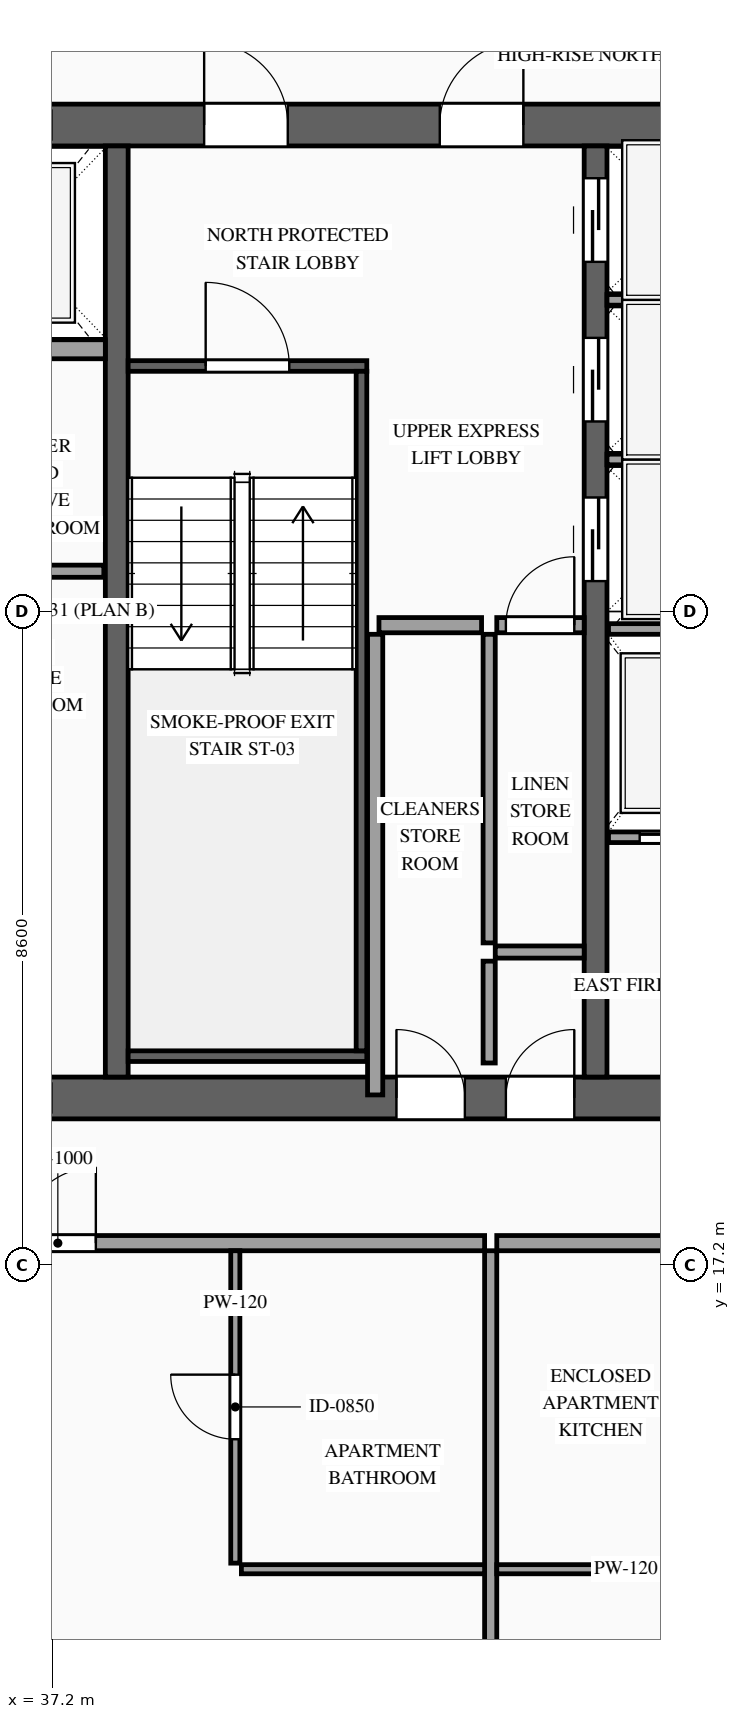
"""IFC4 building model, lengths in metres.
Left out: names, types, materials, properties, quantities, classifications, styles, units other than length and angle.
Written with IfcOpenShell. Run it as: python <this file> out.ifc"""

import sys

from ifc_helpers import new_model, si_unit, direction, frame, frame_2d, origin, place, context, subcontext, project, spatial, rectangle, extrude, source, transform, mapped, element, fill, save


model = new_model("IFC4")
c1 = context("Model", 3, precision=1e-05, world=origin(), true_north=direction((0.0, 1.0)))
c2 = subcontext(c1, "Body", "Model", "MODEL_VIEW")
j1 = project(units=[si_unit("LENGTHUNIT", "METRE"), si_unit("PLANEANGLEUNIT", "RADIAN")], contexts=[c1])
p1 = place(None, origin())
s1 = spatial("IfcSite", under=j1, at=p1, CompositionType="ELEMENT")
p2 = place(p1, origin())
s2 = spatial("IfcBuilding", under=s1, at=p2, CompositionType="ELEMENT")
p3 = place(p2, frame((0.0, 0.0, 268.1)))
s3 = spatial("IfcBuildingStorey", under=s2, at=p3, CompositionType="ELEMENT", Elevation=268.1)
p4 = place(p3, frame((23.525, 19.4, 0.0), z_axis=(0.0, 0.0, 1.0), x_axis=(1.0, 0.0, 0.0)))
e1 = element("IfcWall", 1, at=p4, inside=s3, PredefinedType="SHEAR", context=c2, shape_type="SweptSolid", body=[
    extrude(rectangle(XDim=26.95, YDim=0.55, at=frame_2d((13.475, 0.0))), origin(), (0.0, 0.0, 1.0), 3.5),
])
p5 = place(p4, frame((1.925, 0.0, 0.0)))
e2 = element("IfcOpeningElement", 2, at=p5, cuts=e1, PredefinedType="OPENING", context=c2, shape_type="SweptSolid", body=[
    extrude(rectangle(XDim=1.1, YDim=2.2, at=frame_2d((0.55, 1.1))), frame((0.0, 0.29, 0.0), z_axis=(0.0, -1.0, 0.0), x_axis=(1.0, 0.0, 0.0)), (0.0, 0.0, 1.0), 0.58),
])
p6 = place(p4, frame((9.825, 0.0, 0.0)))
e3 = element("IfcOpeningElement", 3, at=p6, cuts=e1, PredefinedType="OPENING", context=c2, shape_type="SweptSolid", body=[
    extrude(rectangle(XDim=1.1, YDim=2.2, at=frame_2d((0.55, 1.1))), frame((0.0, 0.29, 0.0), z_axis=(0.0, -1.0, 0.0), x_axis=(1.0, 0.0, 0.0)), (0.0, 0.0, 1.0), 0.58),
])
p7 = place(p4, frame((23.025, 0.0, 0.0)))
e4 = element("IfcOpeningElement", 4, at=p7, cuts=e1, PredefinedType="OPENING", context=c2, shape_type="SweptSolid", body=[
    extrude(rectangle(XDim=1.1, YDim=2.2, at=frame_2d((0.55, 1.1))), frame((0.0, 0.29, 0.0), z_axis=(0.0, -1.0, 0.0), x_axis=(1.0, 0.0, 0.0)), (0.0, 0.0, 1.0), 0.58),
])
p8 = place(p4, frame((19.645, 0.0, 0.0)))
e5 = element("IfcOpeningElement", 5, at=p8, cuts=e1, PredefinedType="OPENING", context=c2, shape_type="SweptSolid", body=[
    extrude(rectangle(XDim=0.9, YDim=2.15, at=frame_2d((0.45, 1.075))), frame((0.0, 0.29, 0.0), z_axis=(0.0, -1.0, 0.0), x_axis=(1.0, 0.0, 0.0)), (0.0, 0.0, 1.0), 0.58),
])
p9 = place(p4, frame((18.205, 0.0, 0.0)))
e6 = element("IfcOpeningElement", 6, at=p9, cuts=e1, PredefinedType="OPENING", context=c2, shape_type="SweptSolid", body=[
    extrude(rectangle(XDim=0.9, YDim=2.15, at=frame_2d((0.45, 1.075))), frame((0.0, 0.29, 0.0), z_axis=(0.0, -1.0, 0.0), x_axis=(1.0, 0.0, 0.0)), (0.0, 0.0, 1.0), 0.58),
])
p10 = place(p3, frame((23.525, 32.2, 0.0), z_axis=(0.0, 0.0, 1.0), x_axis=(1.0, 0.0, 0.0)))
e7 = element("IfcWall", 7, at=p10, inside=s3, PredefinedType="SHEAR", context=c2, shape_type="SweptSolid", body=[
    extrude(rectangle(XDim=26.95, YDim=0.55, at=frame_2d((13.475, 0.0))), origin(), (0.0, 0.0, 1.0), 3.5),
])
p11 = place(p10, frame((4.545, 0.0, 0.0)))
e8 = element("IfcOpeningElement", 8, at=p11, cuts=e7, PredefinedType="OPENING", context=c2, shape_type="SweptSolid", body=[
    extrude(rectangle(XDim=0.9, YDim=2.15, at=frame_2d((0.45, 1.075))), frame((0.0, 0.29, 0.0), z_axis=(0.0, -1.0, 0.0), x_axis=(1.0, 0.0, 0.0)), (0.0, 0.0, 1.0), 0.58),
])
p12 = place(p10, frame((9.825, 0.0, 0.0)))
e9 = element("IfcOpeningElement", 9, at=p12, cuts=e7, PredefinedType="OPENING", context=c2, shape_type="SweptSolid", body=[
    extrude(rectangle(XDim=1.1, YDim=2.2, at=frame_2d((0.55, 1.1))), frame((0.0, 0.29, 0.0), z_axis=(0.0, -1.0, 0.0), x_axis=(1.0, 0.0, 0.0)), (0.0, 0.0, 1.0), 0.58),
])
p13 = place(p10, frame((15.675, 0.0, 0.0)))
e10 = element("IfcOpeningElement", 10, at=p13, cuts=e7, PredefinedType="OPENING", context=c2, shape_type="SweptSolid", body=[
    extrude(rectangle(XDim=1.1, YDim=2.2, at=frame_2d((0.55, 1.1))), frame((0.0, 0.29, 0.0), z_axis=(0.0, -1.0, 0.0), x_axis=(1.0, 0.0, 0.0)), (0.0, 0.0, 1.0), 0.58),
])
p14 = place(p10, frame((18.775, 0.0, 0.0)))
e11 = element("IfcOpeningElement", 11, at=p14, cuts=e7, PredefinedType="OPENING", context=c2, shape_type="SweptSolid", body=[
    extrude(rectangle(XDim=1.1, YDim=2.2, at=frame_2d((0.55, 1.1))), frame((0.0, 0.29, 0.0), z_axis=(0.0, -1.0, 0.0), x_axis=(1.0, 0.0, 0.0)), (0.0, 0.0, 1.0), 0.58),
])
m1 = source(origin(), c2, "Body", "SweptSolid", [
    extrude(rectangle(XDim=12.25, YDim=0.3, at=frame_2d((6.125, 0.0))), origin(), (0.0, 0.0, 1.0), 3.5),
])
p15 = place(p3, frame((38.05, 19.675, 0.0), z_axis=(0.0, 0.0, 1.0), x_axis=(0.0, 1.0, 0.0)))
e12 = element("IfcWall", 12, at=p15, inside=s3, PredefinedType="SOLIDWALL", context=c2, shape_type="MappedRepresentation", body=[
    mapped(m1, transform((0.0, 0.0, 0.0), scale=1.0)),
])
p16 = place(p3, frame((44.35, 19.675, 0.0), z_axis=(0.0, 0.0, 1.0), x_axis=(0.0, 1.0, 0.0)))
e13 = element("IfcWall", 13, at=p16, inside=s3, PredefinedType="SOLIDWALL", context=c2, shape_type="SweptSolid", body=[
    extrude(rectangle(XDim=12.25, YDim=0.3, at=frame_2d((6.125, 0.0))), origin(), (0.0, 0.0, 1.0), 3.5),
])
p17 = place(p16, frame((6.525, 0.0, 0.0)))
e14 = element("IfcOpeningElement", 14, at=p17, cuts=e13, PredefinedType="OPENING", context=c2, shape_type="SweptSolid", body=[
    extrude(rectangle(XDim=1.1, YDim=2.2, at=frame_2d((0.55, 1.1))), frame((0.0, 0.165, 0.0), z_axis=(0.0, -1.0, 0.0), x_axis=(1.0, 0.0, 0.0)), (0.0, 0.0, 1.0), 0.33),
])
p18 = place(p16, frame((8.625, 0.0, 0.0)))
e15 = element("IfcOpeningElement", 15, at=p18, cuts=e13, PredefinedType="OPENING", context=c2, shape_type="SweptSolid", body=[
    extrude(rectangle(XDim=1.1, YDim=2.2, at=frame_2d((0.55, 1.1))), frame((0.0, 0.165, 0.0), z_axis=(0.0, -1.0, 0.0), x_axis=(1.0, 0.0, 0.0)), (0.0, 0.0, 1.0), 0.33),
])
p19 = place(p16, frame((10.725, 0.0, 0.0)))
e16 = element("IfcOpeningElement", 16, at=p19, cuts=e13, PredefinedType="OPENING", context=c2, shape_type="SweptSolid", body=[
    extrude(rectangle(XDim=1.1, YDim=2.2, at=frame_2d((0.55, 1.1))), frame((0.0, 0.165, 0.0), z_axis=(0.0, -1.0, 0.0), x_axis=(1.0, 0.0, 0.0)), (0.0, 0.0, 1.0), 0.33),
])
p20 = place(p3, frame((44.52, 22.83, 0.0), z_axis=(0.0, 0.0, 1.0), x_axis=(1.0, 0.0, 0.0)))
e17 = element("IfcWall", 17, at=p20, inside=s3, PredefinedType="SOLIDWALL", context=c2, shape_type="SweptSolid", body=[
    extrude(rectangle(XDim=1.92, YDim=0.14, at=frame_2d((0.96, 0.0))), origin(), (0.0, 0.0, 1.0), 3.28),
])
p21 = place(p20, frame((0.41, 0.0, 0.0)))
e18 = element("IfcOpeningElement", 18, at=p21, cuts=e17, PredefinedType="OPENING", context=c2, shape_type="SweptSolid", body=[
    extrude(rectangle(XDim=1.1, YDim=2.2, at=frame_2d((0.55, 1.1))), frame((0.0, 0.085, 0.0), z_axis=(0.0, -1.0, 0.0), x_axis=(1.0, 0.0, 0.0)), (0.0, 0.0, 1.0), 0.17),
])
m2 = source(origin(), c2, "Body", "SweptSolid", [
    extrude(rectangle(XDim=1.92, YDim=0.14, at=frame_2d((0.96, 0.0))), origin(), (0.0, 0.0, 1.0), 3.28),
])
p22 = place(p3, frame((44.52, 25.57, 0.0), z_axis=(0.0, 0.0, 1.0), x_axis=(1.0, 0.0, 0.0)))
e19 = element("IfcWall", 19, at=p22, inside=s3, PredefinedType="SOLIDWALL", context=c2, shape_type="MappedRepresentation", body=[
    mapped(m2, transform((0.0, 0.0, 0.0), scale=1.0)),
])
m3 = source(origin(), c2, "Body", "SweptSolid", [
    extrude(rectangle(XDim=2.4, YDim=0.25, at=frame_2d((1.2, 0.0))), origin(), (0.0, 0.0, 1.0), 3.28),
])
p23 = place(p3, frame((35.5, 29.25, 0.0), z_axis=(0.0, 0.0, 1.0), x_axis=(1.0, 0.0, 0.0)))
e20 = element("IfcWall", 20, at=p23, inside=s3, PredefinedType="SOLIDWALL", context=c2, shape_type="MappedRepresentation", body=[
    mapped(m3, transform((0.0, 0.0, 0.0), scale=1.0)),
])
m4 = source(origin(), c2, "Body", "SweptSolid", [
    extrude(rectangle(XDim=2.0, YDim=0.14, at=frame_2d((1.0, 0.0))), origin(), (0.0, 0.0, 1.0), 3.28),
])
for number, where, z_axis, x_axis in (
    (21, (44.5, 27.8, 0.0), (0.0, 0.0, 1.0), (1.0, 0.0, 0.0)),
    (22, (44.5, 29.9, 0.0), (0.0, 0.0, 1.0), (1.0, 0.0, 0.0)),
):
    element("IfcWall", number, at=place(p3, frame(where, z_axis=z_axis, x_axis=x_axis)), inside=s3, PredefinedType="SOLIDWALL", context=c2, shape_type="MappedRepresentation", body=[
        mapped(m4, transform((0.0, 0.0, 0.0), scale=1.0)),
    ])
p24 = place(p3, frame((38.2, 29.03, 0.0), z_axis=(0.0, 0.0, 1.0), x_axis=(1.0, 0.0, 0.0)))
e23 = element("IfcWall", 23, at=p24, inside=s3, PredefinedType="SOLIDWALL", context=c2, shape_type="SweptSolid", body=[
    extrude(rectangle(XDim=3.14, YDim=0.14, at=frame_2d((1.57, 0.0))), origin(), (0.0, 0.0, 1.0), 3.28),
])
p25 = place(p24, frame((1.02, 0.0, 0.0)))
e24 = element("IfcOpeningElement", 24, at=p25, cuts=e23, PredefinedType="OPENING", context=c2, shape_type="SweptSolid", body=[
    extrude(rectangle(XDim=1.1, YDim=2.2, at=frame_2d((0.55, 1.1))), frame((0.0, 0.085, 0.0), z_axis=(0.0, -1.0, 0.0), x_axis=(1.0, 0.0, 0.0)), (0.0, 0.0, 1.0), 0.17),
])
m5 = source(origin(), c2, "Body", "SweptSolid", [
    extrude(rectangle(XDim=3.14, YDim=0.14, at=frame_2d((1.57, 0.0))), origin(), (0.0, 0.0, 1.0), 3.28),
])
p26 = place(p3, frame((38.2, 19.95, 0.0), z_axis=(0.0, 0.0, 1.0), x_axis=(1.0, 0.0, 0.0)))
e25 = element("IfcWall", 25, at=p26, inside=s3, PredefinedType="SOLIDWALL", context=c2, shape_type="MappedRepresentation", body=[
    mapped(m5, transform((0.0, 0.0, 0.0), scale=1.0)),
])
m6 = source(origin(), c2, "Body", "SweptSolid", [
    extrude(rectangle(XDim=8.94, YDim=0.14, at=frame_2d((4.47, 0.0))), origin(), (0.0, 0.0, 1.0), 3.28),
])
p27 = place(p3, frame((41.27, 20.02, 0.0), z_axis=(0.0, 0.0, 1.0), x_axis=(0.0, 1.0, 0.0)))
e26 = element("IfcWall", 26, at=p27, inside=s3, PredefinedType="SOLIDWALL", context=c2, shape_type="MappedRepresentation", body=[
    mapped(m6, transform((0.0, 0.0, 0.0), scale=1.0)),
])
m7 = source(origin(), c2, "Body", "SweptSolid", [
    extrude(rectangle(XDim=2.36, YDim=0.16, at=frame_2d((1.18, 0.0))), origin(), (0.0, 0.0, 1.0), 3.28),
])
p28 = place(p3, frame((35.52, 26.33, 0.0), z_axis=(0.0, 0.0, 1.0), x_axis=(1.0, 0.0, 0.0)))
e27 = element("IfcWall", 27, at=p28, inside=s3, PredefinedType="PARTITIONING", context=c2, shape_type="MappedRepresentation", body=[
    mapped(m7, transform((0.0, 0.0, 0.0), scale=1.0)),
])
m8 = source(origin(), c2, "Body", "SweptSolid", [
    extrude(rectangle(XDim=1.34, YDim=0.16, at=frame_2d((0.67, 0.0))), origin(), (0.0, 0.0, 1.0), 3.28),
])
p29 = place(p3, frame((42.95, 19.86, 0.0), z_axis=(0.0, 0.0, 1.0), x_axis=(0.0, 1.0, 0.0)))
e28 = element("IfcWall", 28, at=p29, inside=s3, PredefinedType="PARTITIONING", context=c2, shape_type="MappedRepresentation", body=[
    mapped(m8, transform((0.0, 0.0, 0.0), scale=1.0)),
])
m9 = source(origin(), c2, "Body", "SweptSolid", [
    extrude(rectangle(XDim=1.17, YDim=0.16, at=frame_2d((0.585, 0.0))), origin(), (0.0, 0.0, 1.0), 3.28),
])
p30 = place(p3, frame((43.03, 21.32, 0.0), z_axis=(0.0, 0.0, 1.0), x_axis=(1.0, 0.0, 0.0)))
e29 = element("IfcWall", 29, at=p30, inside=s3, PredefinedType="PARTITIONING", context=c2, shape_type="MappedRepresentation", body=[
    mapped(m9, transform((0.0, 0.0, 0.0), scale=1.0)),
])
m10 = source(origin(), c2, "Body", "SweptSolid", [
    extrude(rectangle(XDim=6.06, YDim=0.2, at=frame_2d((3.03, 0.0))), origin(), (0.0, 0.0, 1.0), 3.28),
])
p31 = place(p3, frame((41.45, 19.44, 0.0), z_axis=(0.0, 0.0, 1.0), x_axis=(0.0, 1.0, 0.0)))
e30 = element("IfcWall", 30, at=p31, inside=s3, PredefinedType="PARTITIONING", context=c2, shape_type="MappedRepresentation", body=[
    mapped(m10, transform((0.0, 0.0, 0.0), scale=1.0)),
])
m11 = source(origin(), c2, "Body", "SweptSolid", [
    extrude(rectangle(XDim=1.35, YDim=0.2, at=frame_2d((0.675, 0.0))), origin(), (0.0, 0.0, 1.0), 3.28),
])
p32 = place(p3, frame((41.5, 25.62, 0.0), z_axis=(0.0, 0.0, 1.0), x_axis=(1.0, 0.0, 0.0)))
e31 = element("IfcWall", 31, at=p32, inside=s3, PredefinedType="PARTITIONING", context=c2, shape_type="MappedRepresentation", body=[
    mapped(m11, transform((0.0, 0.0, 0.0), scale=1.0)),
])
m12 = source(origin(), c2, "Body", "SweptSolid", [
    extrude(rectangle(XDim=4.06, YDim=0.16, at=frame_2d((2.03, 0.0))), origin(), (0.0, 0.0, 1.0), 3.28),
])
p33 = place(p3, frame((42.95, 21.44, 0.0), z_axis=(0.0, 0.0, 1.0), x_axis=(0.0, 1.0, 0.0)))
e32 = element("IfcWall", 32, at=p33, inside=s3, PredefinedType="PARTITIONING", context=c2, shape_type="MappedRepresentation", body=[
    mapped(m12, transform((0.0, 0.0, 0.0), scale=1.0)),
])
p34 = place(p3, frame((43.05, 25.62, 0.0), z_axis=(0.0, 0.0, 1.0), x_axis=(1.0, 0.0, 0.0)))
e33 = element("IfcWall", 33, at=p34, inside=s3, PredefinedType="PARTITIONING", context=c2, shape_type="SweptSolid", body=[
    extrude(rectangle(XDim=1.15, YDim=0.2, at=frame_2d((0.575, 0.0))), origin(), (0.0, 0.0, 1.0), 3.28),
])
p35 = place(p34, frame((0.12, 0.0, 0.0)))
e34 = element("IfcOpeningElement", 34, at=p35, cuts=e33, PredefinedType="OPENING", context=c2, shape_type="SweptSolid", body=[
    extrude(rectangle(XDim=0.9, YDim=2.15, at=frame_2d((0.45, 1.075))), frame((0.0, 0.115, 0.0), z_axis=(0.0, -1.0, 0.0), x_axis=(1.0, 0.0, 0.0)), (0.0, 0.0, 1.0), 0.23),
])
p36 = place(p3, frame((31.461, 17.49, 0.0), z_axis=(0.0, 0.0, 1.0), x_axis=(1.0, 0.0, 0.0)))
e35 = element("IfcWall", 35, at=p36, inside=s3, PredefinedType="PARTITIONING", context=c2, shape_type="SweptSolid", body=[
    extrude(rectangle(XDim=11.429, YDim=0.2, at=frame_2d((5.714, 0.0))), origin(), (0.0, 0.0, 1.0), 3.28),
])
p37 = place(p36, frame((5.314, 0.0, 0.0)))
e36 = element("IfcOpeningElement", 36, at=p37, cuts=e35, PredefinedType="OPENING", context=c2, shape_type="SweptSolid", body=[
    extrude(rectangle(XDim=1.0, YDim=2.2, at=frame_2d((0.5, 1.1))), frame((0.0, 0.115, 0.0), z_axis=(0.0, -1.0, 0.0), x_axis=(1.0, 0.0, 0.0)), (0.0, 0.0, 1.0), 0.23),
])
m13 = source(origin(), c2, "Body", "SweptSolid", [
    extrude(rectangle(XDim=12.04, YDim=0.16, at=frame_2d((6.02, 0.0))), origin(), (0.0, 0.0, 1.0), 3.28),
])
p38 = place(p3, frame((42.97, 5.35, 0.0), z_axis=(0.0, 0.0, 1.0), x_axis=(0.0, 1.0, 0.0)))
e37 = element("IfcWall", 37, at=p38, inside=s3, PredefinedType="PARTITIONING", context=c2, shape_type="MappedRepresentation", body=[
    mapped(m13, transform((0.0, 0.0, 0.0), scale=1.0)),
])
m14 = source(origin(), c2, "Body", "SweptSolid", [
    extrude(rectangle(XDim=3.2, YDim=0.12, at=frame_2d((1.6, 0.0))), origin(), (0.0, 0.0, 1.0), 3.28),
])
p39 = place(p3, frame((39.69, 13.2, 0.0), z_axis=(0.0, 0.0, 1.0), x_axis=(1.0, 0.0, 0.0)))
e38 = element("IfcWall", 38, at=p39, inside=s3, PredefinedType="PARTITIONING", context=c2, shape_type="MappedRepresentation", body=[
    mapped(m14, transform((0.0, 0.0, 0.0), scale=1.0)),
])
p40 = place(p3, frame((39.61, 13.28, 0.0), z_axis=(0.0, 0.0, 1.0), x_axis=(0.0, 1.0, 0.0)))
e39 = element("IfcWall", 39, at=p40, inside=s3, PredefinedType="PARTITIONING", context=c2, shape_type="SweptSolid", body=[
    extrude(rectangle(XDim=4.11, YDim=0.12, at=frame_2d((2.055, 0.0))), origin(), (0.0, 0.0, 1.0), 3.28),
])
p41 = place(p40, frame((1.63, 0.0, 0.0)))
e40 = element("IfcOpeningElement", 40, at=p41, cuts=e39, PredefinedType="OPENING", context=c2, shape_type="SweptSolid", body=[
    extrude(rectangle(XDim=0.85, YDim=2.1, at=frame_2d((0.425, 1.05))), frame((0.0, 0.075, 0.0), z_axis=(0.0, -1.0, 0.0), x_axis=(1.0, 0.0, 0.0)), (0.0, 0.0, 1.0), 0.15),
])
p42 = place(p3, frame((43.05, 17.49, 0.0), z_axis=(0.0, 0.0, 1.0), x_axis=(1.0, 0.0, 0.0)))
e41 = element("IfcWall", 41, at=p42, inside=s3, PredefinedType="PARTITIONING", context=c2, shape_type="SweptSolid", body=[
    extrude(rectangle(XDim=11.51, YDim=0.2, at=frame_2d((5.755, 0.0))), origin(), (0.0, 0.0, 1.0), 3.28),
])
p43 = place(p42, frame((5.355, 0.0, 0.0)))
e42 = element("IfcOpeningElement", 42, at=p43, cuts=e41, PredefinedType="OPENING", context=c2, shape_type="SweptSolid", body=[
    extrude(rectangle(XDim=1.0, YDim=2.2, at=frame_2d((0.5, 1.1))), frame((0.0, 0.115, 0.0), z_axis=(0.0, -1.0, 0.0), x_axis=(1.0, 0.0, 0.0)), (0.0, 0.0, 1.0), 0.23),
])
m15 = source(origin(), c2, "Body", "SweptSolid", [
    extrude(rectangle(XDim=3.4, YDim=0.12, at=frame_2d((1.7, 0.0))), origin(), (0.0, 0.0, 1.0), 3.28),
])
p44 = place(p3, frame((43.05, 13.2, 0.0), z_axis=(0.0, 0.0, 1.0), x_axis=(1.0, 0.0, 0.0)))
e43 = element("IfcWall", 43, at=p44, inside=s3, PredefinedType="PARTITIONING", context=c2, shape_type="MappedRepresentation", body=[
    mapped(m15, transform((0.0, 0.0, 0.0), scale=1.0)),
])
m16 = source(origin(), c2, "Body", "SweptSolid", [
    extrude(rectangle(XDim=1.1, YDim=2.2, at=frame_2d((0.55, 1.1))), frame((0.0, 0.025, 0.0), z_axis=(0.0, -1.0, 0.0), x_axis=(1.0, 0.0, 0.0)), (0.0, 0.0, 1.0), 0.05),
])
p45 = place(p21, origin())
e44 = element("IfcDoor", 44, at=p45, inside=s3, OperationType="SLIDING_TO_RIGHT", PredefinedType="DOOR", context=c2, shape_type="MappedRepresentation", body=[
    mapped(m16, transform((0.0, 0.0, 0.0), scale=1.0)),
])
fill(e18, e44)
p46 = place(p17, origin())
e45 = element("IfcDoor", 45, at=p46, inside=s3, OperationType="SLIDING_TO_LEFT", PredefinedType="DOOR", context=c2, shape_type="MappedRepresentation", body=[
    mapped(m16, transform((0.0, 0.0, 0.0), scale=1.0)),
])
fill(e14, e45)
p47 = place(p18, origin())
e46 = element("IfcDoor", 46, at=p47, inside=s3, OperationType="SLIDING_TO_RIGHT", PredefinedType="DOOR", context=c2, shape_type="MappedRepresentation", body=[
    mapped(m16, transform((0.0, 0.0, 0.0), scale=1.0)),
])
fill(e15, e46)
p48 = place(p19, origin())
e47 = element("IfcDoor", 47, at=p48, inside=s3, OperationType="SLIDING_TO_LEFT", PredefinedType="DOOR", context=c2, shape_type="MappedRepresentation", body=[
    mapped(m16, transform((0.0, 0.0, 0.0), scale=1.0)),
])
fill(e16, e47)
m17 = source(origin(), c2, "Body", "SweptSolid", [
    extrude(rectangle(XDim=1.1, YDim=2.2, at=frame_2d((0.55, 1.1))), frame((0.0, 0.025, 0.0), z_axis=(0.0, -1.0, 0.0), x_axis=(1.0, 0.0, 0.0)), (0.0, 0.0, 1.0), 0.05),
])
p49 = place(p25, origin())
e48 = element("IfcDoor", 48, at=p49, inside=s3, OperationType="SINGLE_SWING_LEFT", PredefinedType="DOOR", context=c2, shape_type="MappedRepresentation", body=[
    mapped(m17, transform((0.0, 0.0, 0.0), scale=1.0)),
])
fill(e24, e48)
p50 = place(p13, origin())
e49 = element("IfcDoor", 49, at=p50, inside=s3, OperationType="SINGLE_SWING_LEFT", PredefinedType="DOOR", context=c2, shape_type="MappedRepresentation", body=[
    mapped(m17, transform((0.0, 0.0, 0.0), scale=1.0)),
])
fill(e10, e49)
p51 = place(p14, origin())
e50 = element("IfcDoor", 50, at=p51, inside=s3, OperationType="SINGLE_SWING_RIGHT", PredefinedType="DOOR", context=c2, shape_type="MappedRepresentation", body=[
    mapped(m17, transform((0.0, 0.0, 0.0), scale=1.0)),
])
fill(e11, e50)
m18 = source(origin(), c2, "Body", "SweptSolid", [
    extrude(rectangle(XDim=0.9, YDim=2.15, at=frame_2d((0.45, 1.075))), frame((0.0, 0.025, 0.0), z_axis=(0.0, -1.0, 0.0), x_axis=(1.0, 0.0, 0.0)), (0.0, 0.0, 1.0), 0.05),
])
p52 = place(p8, origin())
e51 = element("IfcDoor", 51, at=p52, inside=s3, OperationType="SINGLE_SWING_RIGHT", PredefinedType="DOOR", context=c2, shape_type="MappedRepresentation", body=[
    mapped(m18, transform((0.0, 0.0, 0.0), scale=1.0)),
])
fill(e5, e51)
p53 = place(p9, origin())
e52 = element("IfcDoor", 52, at=p53, inside=s3, OperationType="SINGLE_SWING_LEFT", PredefinedType="DOOR", context=c2, shape_type="MappedRepresentation", body=[
    mapped(m18, transform((0.0, 0.0, 0.0), scale=1.0)),
])
fill(e6, e52)
p54 = place(p35, origin())
e53 = element("IfcDoor", 53, at=p54, inside=s3, OperationType="SINGLE_SWING_RIGHT", PredefinedType="DOOR", context=c2, shape_type="MappedRepresentation", body=[
    mapped(m18, transform((0.0, 0.0, 0.0), scale=1.0)),
])
fill(e34, e53)
m19 = source(origin(), c2, "Body", "SweptSolid", [
    extrude(rectangle(XDim=1.0, YDim=2.2, at=frame_2d((0.5, 1.1))), frame((0.0, 0.025, 0.0), z_axis=(0.0, -1.0, 0.0), x_axis=(1.0, 0.0, 0.0)), (0.0, 0.0, 1.0), 0.05),
])
p55 = place(p37, origin())
e54 = element("IfcDoor", 54, at=p55, inside=s3, OperationType="SINGLE_SWING_RIGHT", PredefinedType="DOOR", context=c2, shape_type="MappedRepresentation", body=[
    mapped(m19, transform((0.0, 0.0, 0.0), scale=1.0)),
])
fill(e36, e54)
m20 = source(origin(), c2, "Body", "SweptSolid", [
    extrude(rectangle(XDim=0.85, YDim=2.1, at=frame_2d((0.425, 1.05))), frame((0.0, 0.025, 0.0), z_axis=(0.0, -1.0, 0.0), x_axis=(1.0, 0.0, 0.0)), (0.0, 0.0, 1.0), 0.05),
])
p56 = place(p41, origin())
e55 = element("IfcDoor", 55, at=p56, inside=s3, OperationType="SINGLE_SWING_RIGHT", PredefinedType="DOOR", context=c2, shape_type="MappedRepresentation", body=[
    mapped(m20, transform((0.0, 0.0, 0.0), scale=1.0)),
])
fill(e40, e55)
save(model, sys.argv[1])
